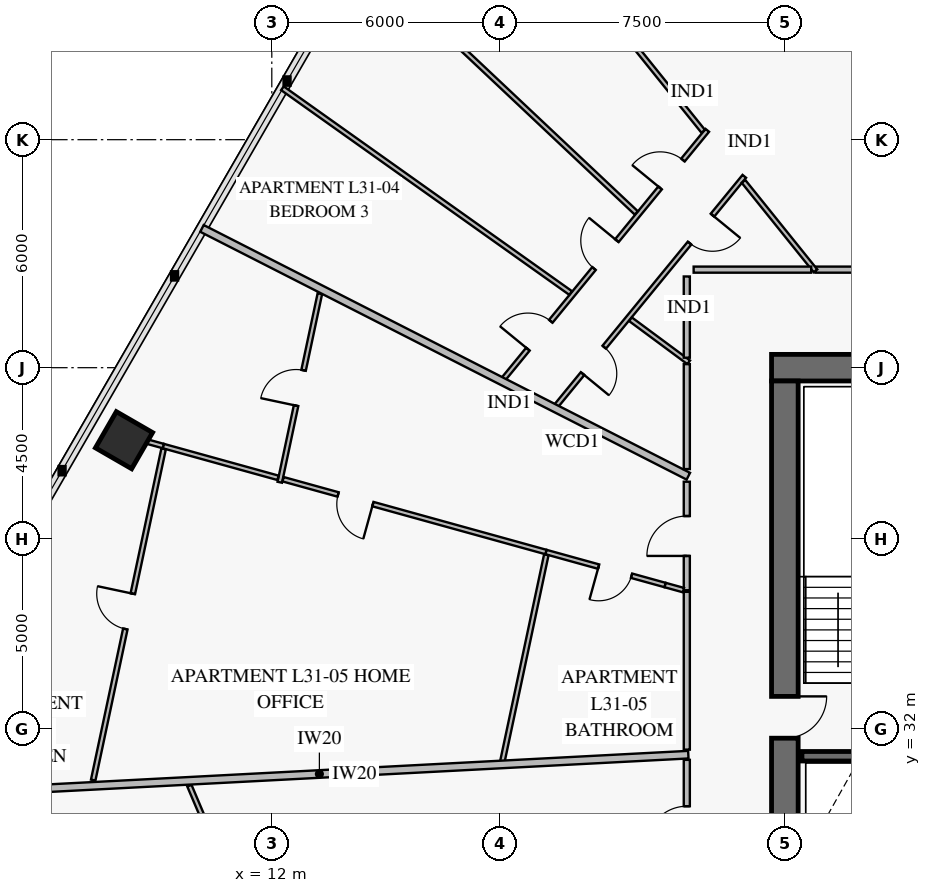
"""IFC4 building model, lengths in metres.
Left out: names, types, materials, properties, quantities, classifications, styles, units other than length and angle.
Written with IfcOpenShell. Run it as: python <this file> out.ifc"""

import sys

from ifc_helpers import new_model, si_unit, direction, frame, frame_2d, origin, origin_2d, place, context, subcontext, project, spatial, rectangle, extrude, element, fill, save


model = new_model("IFC4")
c1 = context("Model", 3, precision=1e-05, world=origin(), true_north=direction((0.0, 1.0)))
c2 = subcontext(c1, "Body", "Model", "MODEL_VIEW")
j1 = project(units=[si_unit("LENGTHUNIT", "METRE"), si_unit("PLANEANGLEUNIT", "RADIAN")], contexts=[c1])
p1 = place(None, origin())
s1 = spatial("IfcSite", under=j1, at=p1, CompositionType="ELEMENT")
p2 = place(p1, origin())
s2 = spatial("IfcBuilding", under=s1, at=p2, CompositionType="ELEMENT")
p3 = place(p2, frame((0.0, 0.0, 126.6)))
s3 = spatial("IfcBuildingStorey", under=s2, at=p3, CompositionType="ELEMENT", Elevation=126.6)
p4 = place(p3, frame((36.75, 41.5, 0.0), z_axis=(0.0, 0.0, 1.0), x_axis=(-1.0, 0.0, 0.0)))
e1 = element("IfcWall", 1, at=p4, inside=s3, PredefinedType="SHEAR", context=c2, shape_type="SweptSolid", body=[
    extrude(rectangle(XDim=11.6, YDim=0.7, at=frame_2d((5.8, 0.0))), origin(), (0.0, 0.0, 1.0), 3.8),
])
p5 = place(p4, frame((4.25, 0.0, 0.0)))
e2 = element("IfcOpeningElement", 2, at=p5, cuts=e1, PredefinedType="OPENING", context=c2, shape_type="SweptSolid", body=[
    extrude(rectangle(XDim=1.1, YDim=2.15, at=frame_2d((0.55, 1.075))), frame((0.0, 0.362, 0.0), z_axis=(0.0, -1.0, 0.0), x_axis=(1.0, 0.0, 0.0)), (0.0, 0.0, 1.0), 0.724),
])
p6 = place(p3, frame((25.5, 22.85, 0.0), z_axis=(0.0, 0.0, 1.0), x_axis=(0.0, 1.0, 0.0)))
e3 = element("IfcWall", 3, at=p6, inside=s3, PredefinedType="SHEAR", context=c2, shape_type="SweptSolid", body=[
    extrude(rectangle(XDim=18.3, YDim=0.7, at=frame_2d((9.15, 0.0))), origin(), (0.0, 0.0, 1.0), 3.8),
])
p7 = place(p6, frame((8.9, 0.0, 0.0)))
e4 = element("IfcOpeningElement", 4, at=p7, cuts=e3, PredefinedType="OPENING", context=c2, shape_type="SweptSolid", body=[
    extrude(rectangle(XDim=1.1, YDim=2.15, at=frame_2d((0.55, 1.075))), frame((0.0, 0.362, 0.0), z_axis=(0.0, -1.0, 0.0), x_axis=(1.0, 0.0, 0.0)), (0.0, 0.0, 1.0), 0.724),
])
p8 = place(p3, frame((8.111, 39.592, 0.0), z_axis=(0.0, 0.0, 1.0), x_axis=(-0.5, -0.866025403784, 0.0)))
e5 = element("IfcColumn", 5, at=p8, inside=s3, PredefinedType="COLUMN", context=c2, shape_type="SweptSolid", body=[
    extrude(rectangle(XDim=1.1, YDim=1.1, at=origin_2d()), origin(), (0.0, 0.0, 1.0), 3.55),
])
p9 = place(p3, frame((25.95, 31.275, 0.0), z_axis=(0.0, 0.0, 1.0), x_axis=(1.0, 0.0, 0.0)))
e6 = element("IfcWall", 6, at=p9, inside=s3, PredefinedType="SOLIDWALL", context=c2, shape_type="SweptSolid", body=[
    extrude(rectangle(XDim=20.1, YDim=0.25, at=frame_2d((10.05, 0.0))), origin(), (0.0, 0.0, 1.0), 3.8),
])
p10 = place(p9, frame((2.6, 0.0, 0.0)))
e7 = element("IfcOpeningElement", 7, at=p10, cuts=e6, PredefinedType="OPENING", context=c2, shape_type="SweptSolid", body=[
    extrude(rectangle(XDim=1.1, YDim=2.15, at=frame_2d((0.55, 1.075))), frame((0.0, 0.137, 0.0), z_axis=(0.0, -1.0, 0.0), x_axis=(1.0, 0.0, 0.0)), (0.0, 0.0, 1.0), 0.274),
])
p11 = place(p9, frame((10.6, 0.0, 0.0)))
e8 = element("IfcOpeningElement", 8, at=p11, cuts=e6, PredefinedType="OPENING", context=c2, shape_type="SweptSolid", body=[
    extrude(rectangle(XDim=1.1, YDim=2.15, at=frame_2d((0.55, 1.075))), frame((0.0, 0.137, 0.0), z_axis=(0.0, -1.0, 0.0), x_axis=(1.0, 0.0, 0.0)), (0.0, 0.0, 1.0), 0.274),
])
p12 = place(p9, frame((16.35, 0.0, 0.0)))
e9 = element("IfcOpeningElement", 9, at=p12, cuts=e6, PredefinedType="OPENING", context=c2, shape_type="SweptSolid", body=[
    extrude(rectangle(XDim=1.1, YDim=2.15, at=frame_2d((0.55, 1.075))), frame((0.0, 0.137, 0.0), z_axis=(0.0, -1.0, 0.0), x_axis=(1.0, 0.0, 0.0)), (0.0, 0.0, 1.0), 0.274),
])
p13 = place(p3, frame((24.433, 46.536, 0.0), z_axis=(0.0, 0.0, 1.0), x_axis=(-0.633934690798, -0.773386583671, 0.0)))
e10 = element("IfcWall", 10, at=p13, inside=s3, PredefinedType="PARTITIONING", context=c2, shape_type="SweptSolid", body=[
    extrude(rectangle(XDim=7.819, YDim=0.12, at=frame_2d((3.909, 0.0))), origin(), (0.0, 0.0, 1.0), 2.85),
])
p14 = place(p13, frame((1.321, 0.0, 0.0)))
e11 = element("IfcOpeningElement", 11, at=p14, cuts=e10, PredefinedType="OPENING", context=c2, shape_type="SweptSolid", body=[
    extrude(rectangle(XDim=0.95, YDim=2.1, at=frame_2d((0.475, 1.05))), frame((0.0, 0.072, 0.0), z_axis=(0.0, -1.0, 0.0), x_axis=(1.0, 0.0, 0.0)), (0.0, 0.0, 1.0), 0.144),
])
p15 = place(p13, frame((5.813, 0.0, 0.0)))
e12 = element("IfcOpeningElement", 12, at=p15, cuts=e10, PredefinedType="OPENING", context=c2, shape_type="SweptSolid", body=[
    extrude(rectangle(XDim=0.9, YDim=2.1, at=frame_2d((0.45, 1.05))), frame((0.0, 0.072, 0.0), z_axis=(0.0, -1.0, 0.0), x_axis=(1.0, 0.0, 0.0)), (0.0, 0.0, 1.0), 0.144),
])
p16 = place(p3, frame((23.459, 47.746, 0.0), z_axis=(0.0, 0.0, 1.0), x_axis=(-0.633918329218, -0.773399994751, 0.0)))
e13 = element("IfcWall", 13, at=p16, inside=s3, PredefinedType="PARTITIONING", context=c2, shape_type="SweptSolid", body=[
    extrude(rectangle(XDim=8.456, YDim=0.12, at=frame_2d((4.228, 0.0))), origin(), (0.0, 0.0, 1.0), 2.85),
])
p17 = place(p16, frame((1.01, 0.0, 0.0)))
e14 = element("IfcOpeningElement", 14, at=p17, cuts=e13, PredefinedType="OPENING", context=c2, shape_type="SweptSolid", body=[
    extrude(rectangle(XDim=0.95, YDim=2.1, at=frame_2d((0.475, 1.05))), frame((0.0, 0.072, 0.0), z_axis=(0.0, -1.0, 0.0), x_axis=(1.0, 0.0, 0.0)), (0.0, 0.0, 1.0), 0.144),
])
p18 = place(p16, frame((3.753, 0.0, 0.0)))
e15 = element("IfcOpeningElement", 15, at=p18, cuts=e13, PredefinedType="OPENING", context=c2, shape_type="SweptSolid", body=[
    extrude(rectangle(XDim=0.95, YDim=2.1, at=frame_2d((0.475, 1.05))), frame((0.0, 0.072, 0.0), z_axis=(0.0, -1.0, 0.0), x_axis=(1.0, 0.0, 0.0)), (0.0, 0.0, 1.0), 0.144),
])
p19 = place(p16, frame((6.496, 0.0, 0.0)))
e16 = element("IfcOpeningElement", 16, at=p19, cuts=e13, PredefinedType="OPENING", context=c2, shape_type="SweptSolid", body=[
    extrude(rectangle(XDim=0.95, YDim=2.1, at=frame_2d((0.475, 1.05))), frame((0.0, 0.072, 0.0), z_axis=(0.0, -1.0, 0.0), x_axis=(1.0, 0.0, 0.0)), (0.0, 0.0, 1.0), 0.144),
])
p20 = place(p3, frame((30.216, 44.08, 0.0), z_axis=(0.0, 0.0, 1.0), x_axis=(-1.0, 0.0, 0.0)))
e17 = element("IfcWall", 17, at=p20, inside=s3, PredefinedType="PARTITIONING", context=c2, shape_type="SweptSolid", body=[
    extrude(rectangle(XDim=3.91, YDim=0.16, at=frame_2d((1.955, 0.0))), origin(), (0.0, 0.0, 1.0), 3.55),
])
p21 = place(p20, frame((1.43, 0.0, 0.0)))
e18 = element("IfcOpeningElement", 18, at=p21, cuts=e17, PredefinedType="OPENING", context=c2, shape_type="SweptSolid", body=[
    extrude(rectangle(XDim=1.05, YDim=2.15, at=frame_2d((0.525, 1.075))), frame((0.0, 0.092, 0.0), z_axis=(0.0, -1.0, 0.0), x_axis=(1.0, 0.0, 0.0)), (0.0, 0.0, 1.0), 0.184),
])
p22 = place(p3, frame((13.265, 43.447, 0.0), z_axis=(0.0, 0.0, 1.0), x_axis=(-0.207901923905, -0.978149676704, 0.0)))
e19 = element("IfcWall", 19, at=p22, inside=s3, PredefinedType="PARTITIONING", context=c2, shape_type="SweptSolid", body=[
    extrude(rectangle(XDim=5.073, YDim=0.12, at=frame_2d((2.537, 0.0))), origin(), (0.0, 0.0, 1.0), 2.85),
])
p23 = place(p22, frame((2.062, 0.0, 0.0)))
e20 = element("IfcOpeningElement", 20, at=p23, cuts=e19, PredefinedType="OPENING", context=c2, shape_type="SweptSolid", body=[
    extrude(rectangle(XDim=0.95, YDim=2.1, at=frame_2d((0.475, 1.05))), frame((0.0, 0.072, 0.0), z_axis=(0.0, -1.0, 0.0), x_axis=(1.0, 0.0, 0.0)), (0.0, 0.0, 1.0), 0.144),
])
p24 = place(p3, frame((22.35, 35.78, 0.0), z_axis=(0.0, 0.0, 1.0), x_axis=(-0.963728241007, 0.266885513816, 0.0)))
e21 = element("IfcWall", 21, at=p24, inside=s3, PredefinedType="PARTITIONING", context=c2, shape_type="SweptSolid", body=[
    extrude(rectangle(XDim=3.255, YDim=0.12, at=frame_2d((1.627, 0.0))), origin(), (0.0, 0.0, 1.0), 2.85),
])
p25 = place(p24, frame((0.917, 0.0, 0.0)))
e22 = element("IfcOpeningElement", 22, at=p25, cuts=e21, PredefinedType="OPENING", context=c2, shape_type="SweptSolid", body=[
    extrude(rectangle(XDim=0.9, YDim=2.1, at=frame_2d((0.45, 1.05))), frame((0.0, 0.072, 0.0), z_axis=(0.0, -1.0, 0.0), x_axis=(1.0, 0.0, 0.0)), (0.0, 0.0, 1.0), 0.144),
])
p26 = place(p3, frame((19.213, 36.649, 0.0), z_axis=(0.0, 0.0, 1.0), x_axis=(-0.963719388082, 0.266917479821, 0.0)))
e23 = element("IfcWall", 23, at=p26, inside=s3, PredefinedType="PARTITIONING", context=c2, shape_type="SweptSolid", body=[
    extrude(rectangle(XDim=7.177, YDim=0.12, at=frame_2d((3.589, 0.0))), origin(), (0.0, 0.0, 1.0), 2.85),
])
p27 = place(p26, frame((4.725, 0.0, 0.0)))
e24 = element("IfcOpeningElement", 24, at=p27, cuts=e23, PredefinedType="OPENING", context=c2, shape_type="SweptSolid", body=[
    extrude(rectangle(XDim=0.95, YDim=2.1, at=frame_2d((0.475, 1.05))), frame((0.0, 0.072, 0.0), z_axis=(0.0, -1.0, 0.0), x_axis=(1.0, 0.0, 0.0)), (0.0, 0.0, 1.0), 0.144),
])
p28 = place(p3, frame((12.165, 38.601, 0.0), z_axis=(0.0, 0.0, 1.0), x_axis=(-0.963725092481, 0.266896882939, 0.0)))
e25 = element("IfcWall", 25, at=p28, inside=s3, PredefinedType="PARTITIONING", context=c2, shape_type="SweptSolid", body=[
    extrude(rectangle(XDim=3.136, YDim=0.12, at=frame_2d((1.568, 0.0))), origin(), (0.0, 0.0, 1.0), 2.85),
])
p29 = place(p3, frame((9.153, 39.365, 0.0), z_axis=(0.0, 0.0, 1.0), x_axis=(-0.207912484837, -0.978147431959, 0.0)))
e26 = element("IfcWall", 26, at=p29, inside=s3, PredefinedType="PARTITIONING", context=c2, shape_type="SweptSolid", body=[
    extrude(rectangle(XDim=8.913, YDim=0.12, at=frame_2d((4.456, 0.0))), origin(), (0.0, 0.0, 1.0), 2.8),
])
p30 = place(p29, frame((3.897, 0.0, 0.0)))
e27 = element("IfcOpeningElement", 27, at=p30, cuts=e26, PredefinedType="OPENING", context=c2, shape_type="SweptSolid", body=[
    extrude(rectangle(XDim=0.95, YDim=2.1, at=frame_2d((0.475, 1.05))), frame((0.0, 0.072, 0.0), z_axis=(0.0, -1.0, 0.0), x_axis=(1.0, 0.0, 0.0)), (0.0, 0.0, 1.0), 0.144),
])
p31 = place(p3, frame((22.92, 38.499, 0.0), z_axis=(0.0, 0.0, 1.0), x_axis=(0.0, -1.0, 0.0)))
e28 = element("IfcWall", 28, at=p31, inside=s3, PredefinedType="PARTITIONING", context=c2, shape_type="SweptSolid", body=[
    extrude(rectangle(XDim=2.856, YDim=0.16, at=frame_2d((1.428, 0.0))), origin(), (0.0, 0.0, 1.0), 2.85),
])
p32 = place(p31, frame((0.903, 0.0, 0.0)))
e29 = element("IfcOpeningElement", 29, at=p32, cuts=e28, PredefinedType="OPENING", context=c2, shape_type="SweptSolid", body=[
    extrude(rectangle(XDim=1.05, YDim=2.15, at=frame_2d((0.525, 1.075))), frame((0.0, 0.092, 0.0), z_axis=(0.0, -1.0, 0.0), x_axis=(1.0, 0.0, 0.0)), (0.0, 0.0, 1.0), 0.184),
])
p33 = place(p3, frame((9.832, 30.5, 0.0), z_axis=(0.0, 0.0, 1.0), x_axis=(0.390720983602, -0.920509159636, 0.0)))
e30 = element("IfcWall", 30, at=p33, inside=s3, PredefinedType="PARTITIONING", context=c2, shape_type="SweptSolid", body=[
    extrude(rectangle(XDim=6.924, YDim=0.12, at=frame_2d((3.462, 0.0))), origin(), (0.0, 0.0, 1.0), 2.85),
])
p34 = place(p33, frame((1.424, 0.0, 0.0)))
e31 = element("IfcOpeningElement", 31, at=p34, cuts=e30, PredefinedType="OPENING", context=c2, shape_type="SweptSolid", body=[
    extrude(rectangle(XDim=0.95, YDim=2.1, at=frame_2d((0.475, 1.05))), frame((0.0, 0.072, 0.0), z_axis=(0.0, -1.0, 0.0), x_axis=(1.0, 0.0, 0.0)), (0.0, 0.0, 1.0), 0.144),
])
p35 = place(p33, frame((4.644, 0.0, 0.0)))
e32 = element("IfcOpeningElement", 32, at=p35, cuts=e30, PredefinedType="OPENING", context=c2, shape_type="SweptSolid", body=[
    extrude(rectangle(XDim=0.95, YDim=2.1, at=frame_2d((0.475, 1.05))), frame((0.0, 0.072, 0.0), z_axis=(0.0, -1.0, 0.0), x_axis=(1.0, 0.0, 0.0)), (0.0, 0.0, 1.0), 0.144),
])
p36 = place(p3, frame((22.92, 31.18, 0.0), z_axis=(0.0, 0.0, 1.0), x_axis=(0.0, -1.0, 0.0)))
e33 = element("IfcWall", 33, at=p36, inside=s3, PredefinedType="PARTITIONING", context=c2, shape_type="SweptSolid", body=[
    extrude(rectangle(XDim=3.49, YDim=0.16, at=frame_2d((1.745, 0.0))), origin(), (0.0, 0.0, 1.0), 2.85),
])
p37 = place(p36, frame((1.22, 0.0, 0.0)))
e34 = element("IfcOpeningElement", 34, at=p37, cuts=e33, PredefinedType="OPENING", context=c2, shape_type="SweptSolid", body=[
    extrude(rectangle(XDim=1.05, YDim=2.15, at=frame_2d((0.525, 1.075))), frame((0.0, 0.092, 0.0), z_axis=(0.0, -1.0, 0.0), x_axis=(1.0, 0.0, 0.0)), (0.0, 0.0, 1.0), 0.184),
])
p38 = place(p3, frame((30.386, 44.04, 0.0), z_axis=(0.0, 0.0, 1.0), x_axis=(-0.422626983595, 0.906303719918, 0.0)))
e35 = element("IfcWall", 35, at=p38, inside=s3, PredefinedType="PARTITIONING", context=c2, shape_type="SweptSolid", body=[
    extrude(rectangle(XDim=18.667, YDim=0.2, at=frame_2d((9.334, 0.0))), origin(), (0.0, 0.0, 1.0), 2.8),
])
p39 = place(p3, frame((22.97, 41.641, 0.0), z_axis=(0.0, 0.0, 1.0), x_axis=(-0.803872525984, 0.59480161564, 0.0)))
e36 = element("IfcWall", 36, at=p39, inside=s3, PredefinedType="PARTITIONING", context=c2, shape_type="SweptSolid", body=[
    extrude(rectangle(XDim=1.906, YDim=0.12, at=frame_2d((0.953, 0.0))), origin(), (0.0, 0.0, 1.0), 3.55),
])
p40 = place(p3, frame((21.59, 45.573, 0.0), z_axis=(0.0, 0.0, 1.0), x_axis=(-0.727936592343, 0.685644454165, 0.0)))
e37 = element("IfcWall", 37, at=p40, inside=s3, PredefinedType="PARTITIONING", context=c2, shape_type="SweptSolid", body=[
    extrude(rectangle(XDim=9.063, YDim=0.12, at=frame_2d((4.532, 0.0))), origin(), (0.0, 0.0, 1.0), 2.8),
])
p41 = place(p3, frame((19.863, 43.465, 0.0), z_axis=(0.0, 0.0, 1.0), x_axis=(-0.815192148017, 0.579190609222, 0.0)))
e38 = element("IfcWall", 38, at=p41, inside=s3, PredefinedType="PARTITIONING", context=c2, shape_type="SweptSolid", body=[
    extrude(rectangle(XDim=9.302, YDim=0.12, at=frame_2d((4.651, 0.0))), origin(), (0.0, 0.0, 1.0), 2.8),
])
p42 = place(p3, frame((26.306, 44.048, 0.0), z_axis=(0.0, 0.0, 1.0), x_axis=(-0.626850349404, 0.779139679038, 0.0)))
e39 = element("IfcWall", 39, at=p42, inside=s3, PredefinedType="PARTITIONING", context=c2, shape_type="SweptSolid", body=[
    extrude(rectangle(XDim=3.022, YDim=0.12, at=frame_2d((1.511, 0.0))), origin(), (0.0, 0.0, 1.0), 3.55),
])
p43 = place(p3, frame((23.351, 47.721, 0.0), z_axis=(0.0, 0.0, 1.0), x_axis=(-0.62686542239, 0.779127551952, 0.0)))
e40 = element("IfcWall", 40, at=p43, inside=s3, PredefinedType="PARTITIONING", context=c2, shape_type="SweptSolid", body=[
    extrude(rectangle(XDim=7.756, YDim=0.12, at=frame_2d((3.878, 0.0))), origin(), (0.0, 0.0, 1.0), 3.1),
])
p44 = place(p3, frame((22.96, 38.644, 0.0), z_axis=(0.0, 0.0, 1.0), x_axis=(-0.891012124705, 0.453979507939, 0.0)))
e41 = element("IfcWall", 41, at=p44, inside=s3, PredefinedType="PARTITIONING", context=c2, shape_type="SweptSolid", body=[
    extrude(rectangle(XDim=14.363, YDim=0.2, at=frame_2d((7.182, 0.0))), origin(), (0.0, 0.0, 1.0), 2.8),
])
p45 = place(p3, frame((22.832, 35.647, 0.0), z_axis=(0.0, 0.0, 1.0), x_axis=(-0.9636855789, 0.267039519584, 0.0)))
e42 = element("IfcWall", 42, at=p45, inside=s3, PredefinedType="PARTITIONING", context=c2, shape_type="SweptSolid", body=[
    extrude(rectangle(XDim=0.5, YDim=0.12, at=frame_2d((0.25, 0.0))), origin(), (0.0, 0.0, 1.0), 2.85),
])
p46 = place(p3, frame((9.143, 39.438, 0.0), z_axis=(0.0, 0.0, 1.0), x_axis=(-0.963794427179, 0.266646399072, 0.0)))
e43 = element("IfcWall", 43, at=p46, inside=s3, PredefinedType="PARTITIONING", context=c2, shape_type="SweptSolid", body=[
    extrude(rectangle(XDim=0.48, YDim=0.12, at=frame_2d((0.24, 0.0))), origin(), (0.0, 0.0, 1.0), 2.85),
])
p47 = place(p3, frame((19.223, 36.576, 0.0), z_axis=(0.0, 0.0, 1.0), x_axis=(-0.20792153834, -0.978145507527, 0.0)))
e44 = element("IfcWall", 44, at=p47, inside=s3, PredefinedType="PARTITIONING", context=c2, shape_type="SweptSolid", body=[
    extrude(rectangle(XDim=5.581, YDim=0.12, at=frame_2d((2.791, 0.0))), origin(), (0.0, 0.0, 1.0), 2.85),
])
p48 = place(p3, frame((22.96, 31.317, 0.0), z_axis=(0.0, 0.0, 1.0), x_axis=(-0.998629494248, -0.052336729143, 0.0)))
e45 = element("IfcWall", 45, at=p48, inside=s3, PredefinedType="PARTITIONING", context=c2, shape_type="SweptSolid", body=[
    extrude(rectangle(XDim=19.443, YDim=0.2, at=frame_2d((9.721, 0.0))), origin(), (0.0, 0.0, 1.0), 2.8),
])
p49 = place(p3, frame((26.193, 44.08, 0.0), z_axis=(0.0, 0.0, 1.0), x_axis=(-1.0, 0.0, 0.0)))
e46 = element("IfcWall", 46, at=p49, inside=s3, PredefinedType="PARTITIONING", context=c2, shape_type="SweptSolid", body=[
    extrude(rectangle(XDim=3.093, YDim=0.16, at=frame_2d((1.546, 0.0))), origin(), (0.0, 0.0, 1.0), 2.85),
])
p50 = place(p3, frame((22.92, 43.9, 0.0), z_axis=(0.0, 0.0, 1.0), x_axis=(0.0, -1.0, 0.0)))
e47 = element("IfcWall", 47, at=p50, inside=s3, PredefinedType="PARTITIONING", context=c2, shape_type="SweptSolid", body=[
    extrude(rectangle(XDim=2.137, YDim=0.16, at=frame_2d((1.069, 0.0))), origin(), (0.0, 0.0, 1.0), 3.55),
])
p51 = place(p3, frame((22.92, 41.594, 0.0), z_axis=(0.0, 0.0, 1.0), x_axis=(0.0, -1.0, 0.0)))
e48 = element("IfcWall", 48, at=p51, inside=s3, PredefinedType="PARTITIONING", context=c2, shape_type="SweptSolid", body=[
    extrude(rectangle(XDim=2.762, YDim=0.16, at=frame_2d((1.381, 0.0))), origin(), (0.0, 0.0, 1.0), 3.55),
])
p52 = place(p3, frame((22.92, 35.602, 0.0), z_axis=(0.0, 0.0, 1.0), x_axis=(0.0, -1.0, 0.0)))
e49 = element("IfcWall", 49, at=p52, inside=s3, PredefinedType="PARTITIONING", context=c2, shape_type="SweptSolid", body=[
    extrude(rectangle(XDim=4.153, YDim=0.16, at=frame_2d((2.076, 0.0))), origin(), (0.0, 0.0, 1.0), 2.85),
])
p53 = place(p7, frame((1.1, 0.0, 0.0), z_axis=(0.0, 0.0, 1.0), x_axis=(-1.0, 0.0, 0.0)))
e50 = element("IfcDoor", 50, at=p53, inside=s3, OperationType="SINGLE_SWING_LEFT", PredefinedType="USERDEFINED", context=c2, shape_type="SweptSolid", body=[
    extrude(rectangle(XDim=1.1, YDim=2.15, at=frame_2d((0.55, 1.075))), frame((0.0, 0.025, 0.0), z_axis=(0.0, -1.0, 0.0), x_axis=(1.0, 0.0, 0.0)), (0.0, 0.0, 1.0), 0.05),
])
fill(e4, e50)
p54 = place(p14, origin())
e51 = element("IfcDoor", 51, at=p54, inside=s3, OperationType="SINGLE_SWING_LEFT", PredefinedType="DOOR", context=c2, shape_type="SweptSolid", body=[
    extrude(rectangle(XDim=0.95, YDim=2.1, at=frame_2d((0.475, 1.05))), frame((0.0, 0.025, 0.0), z_axis=(0.0, -1.0, 0.0), x_axis=(1.0, 0.0, 0.0)), (0.0, 0.0, 1.0), 0.05),
])
fill(e11, e51)
p55 = place(p15, origin())
e52 = element("IfcDoor", 52, at=p55, inside=s3, OperationType="SINGLE_SWING_RIGHT", PredefinedType="DOOR", context=c2, shape_type="SweptSolid", body=[
    extrude(rectangle(XDim=0.9, YDim=2.1, at=frame_2d((0.45, 1.05))), frame((0.0, 0.025, 0.0), z_axis=(0.0, -1.0, 0.0), x_axis=(1.0, 0.0, 0.0)), (0.0, 0.0, 1.0), 0.05),
])
fill(e12, e52)
p56 = place(p17, frame((0.95, 0.0, 0.0), z_axis=(0.0, 0.0, 1.0), x_axis=(-1.0, 0.0, 0.0)))
e53 = element("IfcDoor", 53, at=p56, inside=s3, OperationType="SINGLE_SWING_LEFT", PredefinedType="DOOR", context=c2, shape_type="SweptSolid", body=[
    extrude(rectangle(XDim=0.95, YDim=2.1, at=frame_2d((0.475, 1.05))), frame((0.0, 0.025, 0.0), z_axis=(0.0, -1.0, 0.0), x_axis=(1.0, 0.0, 0.0)), (0.0, 0.0, 1.0), 0.05),
])
fill(e14, e53)
p57 = place(p18, frame((0.95, 0.0, 0.0), z_axis=(0.0, 0.0, 1.0), x_axis=(-1.0, 0.0, 0.0)))
e54 = element("IfcDoor", 54, at=p57, inside=s3, OperationType="SINGLE_SWING_RIGHT", PredefinedType="DOOR", context=c2, shape_type="SweptSolid", body=[
    extrude(rectangle(XDim=0.95, YDim=2.1, at=frame_2d((0.475, 1.05))), frame((0.0, 0.025, 0.0), z_axis=(0.0, -1.0, 0.0), x_axis=(1.0, 0.0, 0.0)), (0.0, 0.0, 1.0), 0.05),
])
fill(e15, e54)
p58 = place(p19, frame((0.95, 0.0, 0.0), z_axis=(0.0, 0.0, 1.0), x_axis=(-1.0, 0.0, 0.0)))
e55 = element("IfcDoor", 55, at=p58, inside=s3, OperationType="SINGLE_SWING_LEFT", PredefinedType="DOOR", context=c2, shape_type="SweptSolid", body=[
    extrude(rectangle(XDim=0.95, YDim=2.1, at=frame_2d((0.475, 1.05))), frame((0.0, 0.025, 0.0), z_axis=(0.0, -1.0, 0.0), x_axis=(1.0, 0.0, 0.0)), (0.0, 0.0, 1.0), 0.05),
])
fill(e16, e55)
p59 = place(p23, frame((0.95, 0.0, 0.0), z_axis=(0.0, 0.0, 1.0), x_axis=(-1.0, 0.0, 0.0)))
e56 = element("IfcDoor", 56, at=p59, inside=s3, OperationType="SINGLE_SWING_LEFT", PredefinedType="DOOR", context=c2, shape_type="SweptSolid", body=[
    extrude(rectangle(XDim=0.95, YDim=2.1, at=frame_2d((0.475, 1.05))), frame((0.0, 0.025, 0.0), z_axis=(0.0, -1.0, 0.0), x_axis=(1.0, 0.0, 0.0)), (0.0, 0.0, 1.0), 0.05),
])
fill(e20, e56)
p60 = place(p25, origin())
e57 = element("IfcDoor", 57, at=p60, inside=s3, OperationType="SINGLE_SWING_RIGHT", PredefinedType="DOOR", context=c2, shape_type="SweptSolid", body=[
    extrude(rectangle(XDim=0.9, YDim=2.1, at=frame_2d((0.45, 1.05))), frame((0.0, 0.025, 0.0), z_axis=(0.0, -1.0, 0.0), x_axis=(1.0, 0.0, 0.0)), (0.0, 0.0, 1.0), 0.05),
])
fill(e22, e57)
p61 = place(p27, origin())
e58 = element("IfcDoor", 58, at=p61, inside=s3, OperationType="SINGLE_SWING_LEFT", PredefinedType="DOOR", context=c2, shape_type="SweptSolid", body=[
    extrude(rectangle(XDim=0.95, YDim=2.1, at=frame_2d((0.475, 1.05))), frame((0.0, 0.025, 0.0), z_axis=(0.0, -1.0, 0.0), x_axis=(1.0, 0.0, 0.0)), (0.0, 0.0, 1.0), 0.05),
])
fill(e24, e58)
p62 = place(p30, frame((0.95, 0.0, 0.0), z_axis=(0.0, 0.0, 1.0), x_axis=(-1.0, 0.0, 0.0)))
e59 = element("IfcDoor", 59, at=p62, inside=s3, OperationType="SINGLE_SWING_RIGHT", PredefinedType="DOOR", context=c2, shape_type="SweptSolid", body=[
    extrude(rectangle(XDim=0.95, YDim=2.1, at=frame_2d((0.475, 1.05))), frame((0.0, 0.025, 0.0), z_axis=(0.0, -1.0, 0.0), x_axis=(1.0, 0.0, 0.0)), (0.0, 0.0, 1.0), 0.05),
])
fill(e27, e59)
p63 = place(p32, frame((1.05, 0.0, 0.0), z_axis=(0.0, 0.0, 1.0), x_axis=(-1.0, 0.0, 0.0)))
e60 = element("IfcDoor", 60, at=p63, inside=s3, OperationType="SINGLE_SWING_LEFT", PredefinedType="DOOR", context=c2, shape_type="SweptSolid", body=[
    extrude(rectangle(XDim=1.05, YDim=2.15, at=frame_2d((0.525, 1.075))), frame((0.0, 0.025, 0.0), z_axis=(0.0, -1.0, 0.0), x_axis=(1.0, 0.0, 0.0)), (0.0, 0.0, 1.0), 0.05),
])
fill(e29, e60)
p64 = place(p37, frame((1.05, 0.0, 0.0), z_axis=(0.0, 0.0, 1.0), x_axis=(-1.0, 0.0, 0.0)))
e61 = element("IfcDoor", 61, at=p64, inside=s3, OperationType="SINGLE_SWING_LEFT", PredefinedType="DOOR", context=c2, shape_type="SweptSolid", body=[
    extrude(rectangle(XDim=1.05, YDim=2.15, at=frame_2d((0.525, 1.075))), frame((0.0, 0.025, 0.0), z_axis=(0.0, -1.0, 0.0), x_axis=(1.0, 0.0, 0.0)), (0.0, 0.0, 1.0), 0.05),
])
fill(e34, e61)
save(model, sys.argv[1])
